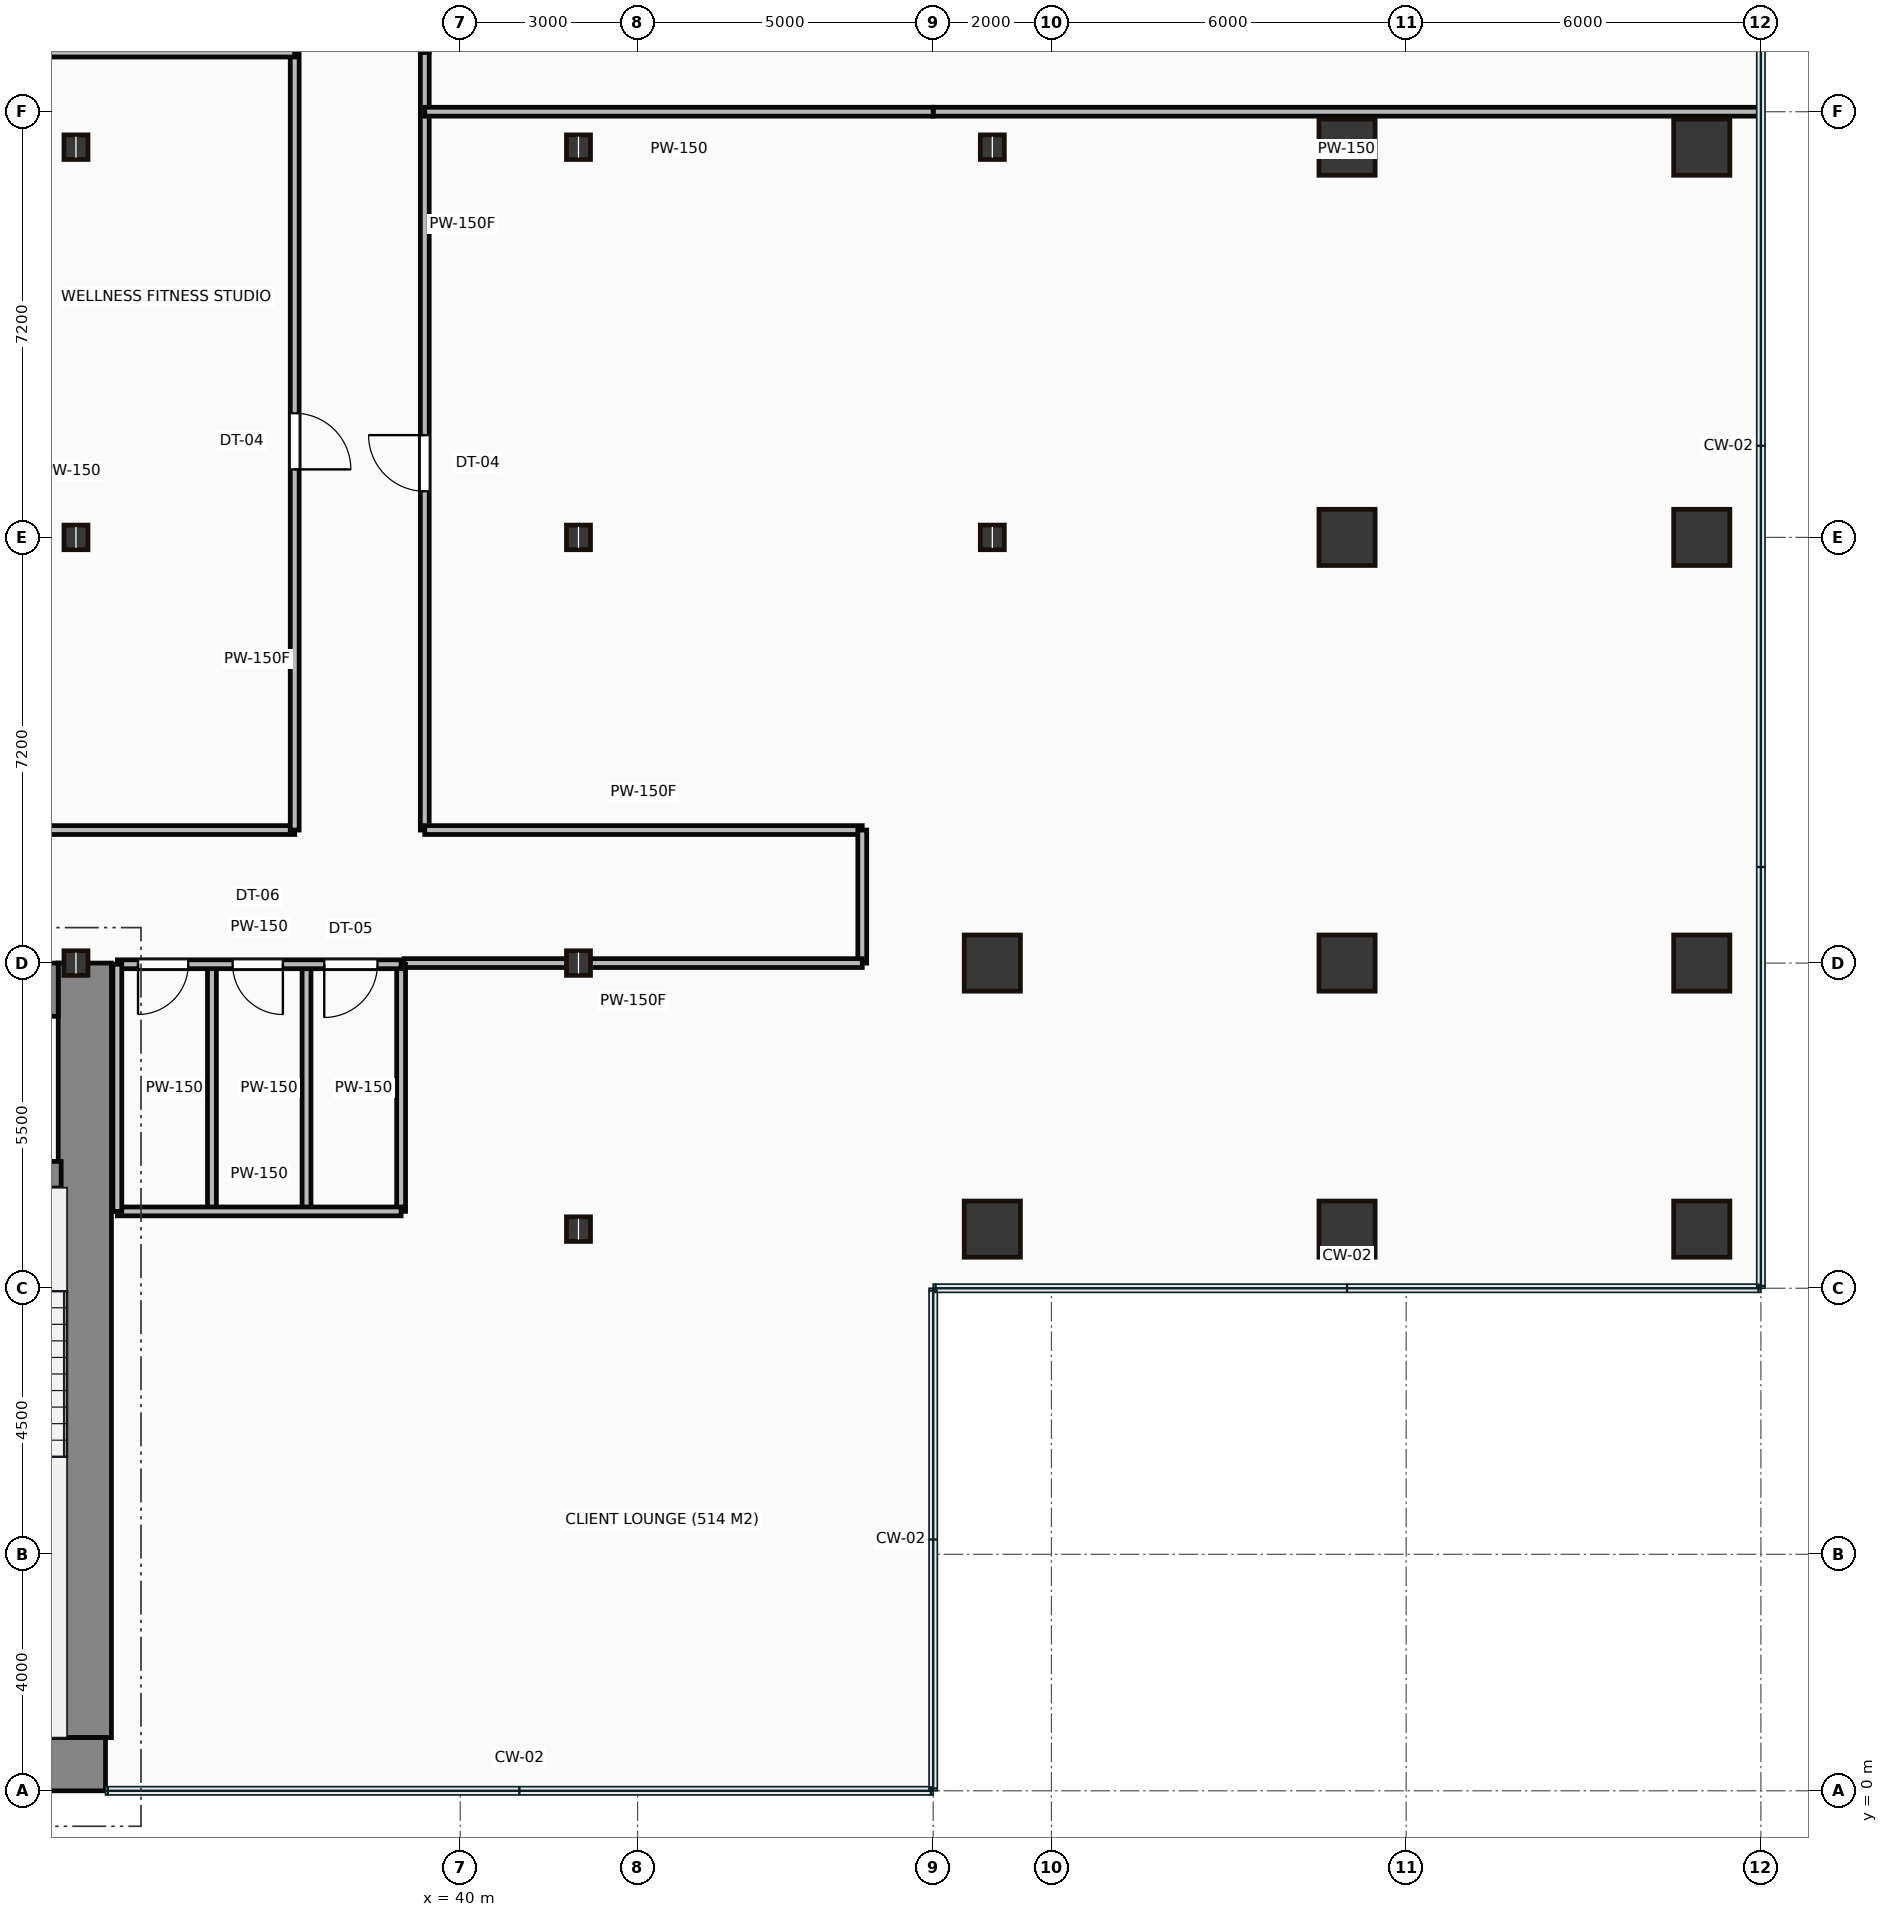
"""IFC4 building model, lengths in metres.
Left out: names, types, materials, properties, quantities, classifications, styles, units other than length and angle.
Written with IfcOpenShell. Run it as: python <this file> out.ifc"""

import sys

from ifc_helpers import new_model, si_unit, direction, frame, frame_2d, origin, origin_2d, place, context, subcontext, project, spatial, rectangle, hollow_rectangle, i_section, extrude, source, transform, mapped, element, fill, save


model = new_model("IFC4")
c1 = context("Model", 3, precision=1e-05, world=origin(), true_north=direction((0.0, 1.0)))
c2 = subcontext(c1, "Body", "Model", "MODEL_VIEW")
j1 = project(units=[si_unit("LENGTHUNIT", "METRE"), si_unit("PLANEANGLEUNIT", "RADIAN")], contexts=[c1])
p1 = place(None, origin())
s1 = spatial("IfcSite", under=j1, at=p1, CompositionType="ELEMENT")
p2 = place(p1, origin())
s2 = spatial("IfcBuilding", under=s1, at=p2, CompositionType="ELEMENT")
p3 = place(p2, frame((0.0, 0.0, 72.65)))
s3 = spatial("IfcBuildingStorey", under=s2, at=p3, CompositionType="ELEMENT", Elevation=72.65)
m1 = source(origin(), c2, "Body", "SweptSolid", [
    extrude(rectangle(XDim=29.5, YDim=0.9, at=frame_2d((14.75, 0.0))), origin(), (0.0, 0.0, 1.0), 3.65),
])
p4 = place(p3, frame((4.5, 0.45, 0.0), z_axis=(0.0, 0.0, 1.0), x_axis=(1.0, 0.0, 0.0)))
e1 = element("IfcWall", 1, at=p4, inside=s3, PredefinedType="SHEAR", context=c2, shape_type="MappedRepresentation", body=[
    mapped(m1, transform((0.0, 0.0, 0.0))),
])
m2 = source(origin(), c2, "Body", "SweptSolid", [
    extrude(rectangle(XDim=13.1, YDim=0.9, at=frame_2d((6.55, 0.0))), origin(), (0.0, 0.0, 1.0), 3.65),
])
p5 = place(p3, frame((33.65, 0.9, 0.0), z_axis=(0.0, 0.0, 1.0), x_axis=(0.0, 1.0, 0.0)))
e2 = element("IfcWall", 2, at=p5, inside=s3, PredefinedType="SHEAR", context=c2, shape_type="MappedRepresentation", body=[
    mapped(m2, transform((0.0, 0.0, 0.0))),
])
m3 = source(origin(), c2, "Body", "SweptSolid", [
    extrude(rectangle(XDim=12.6, YDim=0.9, at=frame_2d((6.3, 0.0))), origin(), (0.0, 0.0, 1.0), 3.65),
])
p6 = place(p3, frame((20.6, 13.55, 0.0), z_axis=(0.0, 0.0, 1.0), x_axis=(1.0, 0.0, 0.0)))
e3 = element("IfcWall", 3, at=p6, inside=s3, PredefinedType="SHEAR", context=c2, shape_type="MappedRepresentation", body=[
    mapped(m3, transform((0.0, 0.0, 0.0))),
])
p7 = place(p6, frame((9.25, 0.0, 0.0)))
e4 = element("IfcOpeningElement", 4, at=p7, cuts=e3, PredefinedType="OPENING", context=c2, shape_type="SweptSolid", body=[
    extrude(rectangle(XDim=1.1, YDim=2.15, at=frame_2d((0.55, 1.075))), frame((0.0, 0.46, 0.0), z_axis=(0.0, -1.0, 0.0), x_axis=(1.0, 0.0, 0.0)), (0.0, 0.0, 1.0), 0.92),
])
m4 = source(origin(), c2, "Body", "SweptSolid", [
    extrude(rectangle(XDim=3.39, YDim=0.45, at=frame_2d((1.695, 0.0))), origin(), (0.0, 0.0, 1.0), 3.65),
])
p8 = place(p3, frame((29.86, 10.42, 0.0), z_axis=(0.0, 0.0, 1.0), x_axis=(1.0, 0.0, 0.0)))
e5 = element("IfcWall", 5, at=p8, inside=s3, PredefinedType="SHEAR", context=c2, shape_type="MappedRepresentation", body=[
    mapped(m4, transform((0.0, 0.0, 0.0))),
])
p9 = place(p8, frame((1.1, 0.0, 0.0)))
e6 = element("IfcOpeningElement", 6, at=p9, cuts=e5, PredefinedType="OPENING", context=c2, shape_type="SweptSolid", body=[
    extrude(rectangle(XDim=1.1, YDim=2.15, at=frame_2d((0.55, 1.075))), frame((0.0, 0.235, 0.0), z_axis=(0.0, -1.0, 0.0), x_axis=(1.0, 0.0, 0.0)), (0.0, 0.0, 1.0), 0.47),
])
m5 = source(origin(), c2, "Body", "SweptSolid", [
    extrude(i_section(OverallWidth=0.406, OverallDepth=0.416, WebThickness=0.03, FlangeThickness=0.048, at=origin_2d()), origin(), (0.0, 0.0, 1.0), 3.65),
])
for number, where, z_axis, x_axis in (
    (7, (33.5, 14.0, 0.0), (0.0, 0.0, 1.0), (1.0, 0.0, 0.0)),
    (8, (33.5, 21.2, 0.0), (0.0, 0.0, 1.0), (1.0, 0.0, 0.0)),
    (9, (33.5, 27.8, 0.0), (0.0, 0.0, 1.0), (1.0, 0.0, 0.0)),
    (10, (42.0, 9.5, 0.0), (0.0, 0.0, 1.0), (1.0, 0.0, 0.0)),
    (11, (42.0, 14.0, 0.0), (0.0, 0.0, 1.0), (1.0, 0.0, 0.0)),
    (12, (42.0, 21.2, 0.0), (0.0, 0.0, 1.0), (1.0, 0.0, 0.0)),
    (13, (42.0, 27.8, 0.0), (0.0, 0.0, 1.0), (1.0, 0.0, 0.0)),
):
    element("IfcColumn", number, at=place(p3, frame(where, z_axis=z_axis, x_axis=x_axis)), inside=s3, PredefinedType="COLUMN", context=c2, shape_type="MappedRepresentation", body=[
        mapped(m5, transform((0.0, 0.0, 0.0))),
    ])
m6 = source(origin(), c2, "Body", "SweptSolid", [
    extrude(hollow_rectangle(XDim=0.95, YDim=0.95, WallThickness=0.045, at=origin_2d()), origin(), (0.0, 0.0, 1.0), 3.65),
])
for number, where, z_axis, x_axis in (
    (14, (49.0, 9.5, 0.0), (0.0, 0.0, 1.0), (1.0, 0.0, 0.0)),
    (15, (49.0, 14.0, 0.0), (0.0, 0.0, 1.0), (1.0, 0.0, 0.0)),
):
    element("IfcColumn", number, at=place(p3, frame(where, z_axis=z_axis, x_axis=x_axis)), inside=s3, PredefinedType="COLUMN", context=c2, shape_type="MappedRepresentation", body=[
        mapped(m6, transform((0.0, 0.0, 0.0))),
    ])
for number, where, z_axis, x_axis in (
    (16, (49.0, 21.2, 0.0), (0.0, 0.0, 1.0), (1.0, 0.0, 0.0)),
    (17, (49.0, 27.8, 0.0), (0.0, 0.0, 1.0), (1.0, 0.0, 0.0)),
):
    element("IfcColumn", number, at=place(p3, frame(where, z_axis=z_axis, x_axis=x_axis)), inside=s3, PredefinedType="COLUMN", context=c2, shape_type="MappedRepresentation", body=[
        mapped(m5, transform((0.0, 0.0, 0.0))),
    ])
for number, where, z_axis, x_axis in (
    (18, (55.0, 9.5, 0.0), (0.0, 0.0, 1.0), (1.0, 0.0, 0.0)),
    (19, (55.0, 14.0, 0.0), (0.0, 0.0, 1.0), (1.0, 0.0, 0.0)),
    (20, (55.0, 21.2, 0.0), (0.0, 0.0, 1.0), (1.0, 0.0, 0.0)),
    (21, (55.0, 27.8, 0.0), (0.0, 0.0, 1.0), (1.0, 0.0, 0.0)),
    (22, (61.0, 9.5, 0.0), (0.0, 0.0, 1.0), (1.0, 0.0, 0.0)),
    (23, (61.0, 14.0, 0.0), (0.0, 0.0, 1.0), (1.0, 0.0, 0.0)),
    (24, (61.0, 21.2, 0.0), (0.0, 0.0, 1.0), (1.0, 0.0, 0.0)),
    (25, (61.0, 27.8, 0.0), (0.0, 0.0, 1.0), (1.0, 0.0, 0.0)),
):
    element("IfcColumn", number, at=place(p3, frame(where, z_axis=z_axis, x_axis=x_axis)), inside=s3, PredefinedType="COLUMN", context=c2, shape_type="MappedRepresentation", body=[
        mapped(m6, transform((0.0, 0.0, 0.0))),
    ])
m7 = source(origin(), c2, "Body", "SweptSolid", [
    extrude(rectangle(XDim=4.8, YDim=0.15, at=frame_2d((2.4, 0.0))), origin(), (0.0, 0.0, 1.0), 2.625),
])
p10 = place(p3, frame((34.2, 13.98, 0.0), z_axis=(0.0, 0.0, 1.0), x_axis=(1.0, 0.0, 0.0)))
e26 = element("IfcWall", 26, at=p10, inside=s3, PredefinedType="PARTITIONING", context=c2, shape_type="MappedRepresentation", body=[
    mapped(m7, transform((0.0, 0.0, 0.0))),
])
p11 = place(p10, frame((0.35, 0.0, 0.0)))
e27 = element("IfcOpeningElement", 27, at=p11, cuts=e26, PredefinedType="OPENING", context=c2, shape_type="SweptSolid", body=[
    extrude(rectangle(XDim=0.85, YDim=2.1, at=frame_2d((0.425, 1.05))), frame((0.0, 0.085, 0.0), z_axis=(0.0, -1.0, 0.0), x_axis=(1.0, 0.0, 0.0)), (0.0, 0.0, 1.0), 0.17),
])
p12 = place(p10, frame((1.95, 0.0, 0.0)))
e28 = element("IfcOpeningElement", 28, at=p12, cuts=e26, PredefinedType="OPENING", context=c2, shape_type="SweptSolid", body=[
    extrude(rectangle(XDim=0.85, YDim=2.1, at=frame_2d((0.425, 1.05))), frame((0.0, 0.085, 0.0), z_axis=(0.0, -1.0, 0.0), x_axis=(1.0, 0.0, 0.0)), (0.0, 0.0, 1.0), 0.17),
])
p13 = place(p10, frame((3.5, 0.0, 0.0)))
e29 = element("IfcOpeningElement", 29, at=p13, cuts=e26, PredefinedType="OPENING", context=c2, shape_type="SweptSolid", body=[
    extrude(rectangle(XDim=0.9, YDim=2.1, at=frame_2d((0.45, 1.05))), frame((0.0, 0.085, 0.0), z_axis=(0.0, -1.0, 0.0), x_axis=(1.0, 0.0, 0.0)), (0.0, 0.0, 1.0), 0.17),
])
m8 = source(origin(), c2, "Body", "SweptSolid", [
    extrude(rectangle(XDim=4.8, YDim=0.15, at=frame_2d((2.4, 0.0))), origin(), (0.0, 0.0, 1.0), 3.4),
])
p14 = place(p3, frame((34.2, 9.8, 0.0), z_axis=(0.0, 0.0, 1.0), x_axis=(1.0, 0.0, 0.0)))
e30 = element("IfcWall", 30, at=p14, inside=s3, PredefinedType="PARTITIONING", context=c2, shape_type="MappedRepresentation", body=[
    mapped(m8, transform((0.0, 0.0, 0.0))),
])
m9 = source(origin(), c2, "Body", "SweptSolid", [
    extrude(rectangle(XDim=4.18, YDim=0.15, at=frame_2d((2.09, 0.0))), origin(), (0.0, 0.0, 1.0), 3.4),
])
for number, where, z_axis, x_axis in (
    (31, (39.0, 9.8, 0.0), (0.0, 0.0, 1.0), (0.0, 1.0, 0.0)),
    (32, (34.2, 9.8, 0.0), (0.0, 0.0, 1.0), (0.0, 1.0, 0.0)),
    (33, (35.8, 9.8, 0.0), (0.0, 0.0, 1.0), (0.0, 1.0, 0.0)),
    (34, (37.4, 9.8, 0.0), (0.0, 0.0, 1.0), (0.0, 1.0, 0.0)),
):
    element("IfcWall", number, at=place(p3, frame(where, z_axis=z_axis, x_axis=x_axis)), inside=s3, PredefinedType="PARTITIONING", context=c2, shape_type="MappedRepresentation", body=[
        mapped(m9, transform((0.0, 0.0, 0.0))),
    ])
m10 = source(origin(), c2, "Body", "SweptSolid", [
    extrude(rectangle(XDim=13.15, YDim=0.15, at=frame_2d((6.575, 0.0))), origin(), (0.0, 0.0, 1.0), 3.4),
])
p15 = place(p3, frame((39.4, 29.4, 0.0), z_axis=(0.0, 0.0, 1.0), x_axis=(0.0, -1.0, 0.0)))
e35 = element("IfcWall", 35, at=p15, inside=s3, PredefinedType="PARTITIONING", context=c2, shape_type="MappedRepresentation", body=[
    mapped(m10, transform((0.0, 0.0, 0.0))),
])
p16 = place(p15, frame((6.47, 0.0, 0.0)))
e36 = element("IfcOpeningElement", 36, at=p16, cuts=e35, PredefinedType="OPENING", context=c2, shape_type="SweptSolid", body=[
    extrude(rectangle(XDim=0.95, YDim=2.15, at=frame_2d((0.475, 1.075))), frame((0.0, 0.085, 0.0), z_axis=(0.0, -1.0, 0.0), x_axis=(1.0, 0.0, 0.0)), (0.0, 0.0, 1.0), 0.17),
])
m11 = source(origin(), c2, "Body", "SweptSolid", [
    extrude(rectangle(XDim=7.4, YDim=0.15, at=frame_2d((3.7, 0.0))), origin(), (0.0, 0.0, 1.0), 3.4),
])
p17 = place(p3, frame((39.4, 16.25, 0.0), z_axis=(0.0, 0.0, 1.0), x_axis=(1.0, 0.0, 0.0)))
e37 = element("IfcWall", 37, at=p17, inside=s3, PredefinedType="PARTITIONING", context=c2, shape_type="MappedRepresentation", body=[
    mapped(m11, transform((0.0, 0.0, 0.0))),
])
m12 = source(origin(), c2, "Body", "SweptSolid", [
    extrude(rectangle(XDim=2.25, YDim=0.15, at=frame_2d((1.125, 0.0))), origin(), (0.0, 0.0, 1.0), 3.4),
])
p18 = place(p3, frame((46.8, 16.25, 0.0), z_axis=(0.0, 0.0, 1.0), x_axis=(0.0, -1.0, 0.0)))
e38 = element("IfcWall", 38, at=p18, inside=s3, PredefinedType="PARTITIONING", context=c2, shape_type="MappedRepresentation", body=[
    mapped(m12, transform((0.0, 0.0, 0.0))),
])
m13 = source(origin(), c2, "Body", "SweptSolid", [
    extrude(rectangle(XDim=7.75, YDim=0.15, at=frame_2d((3.875, 0.0))), origin(), (0.0, 0.0, 1.0), 2.625),
])
p19 = place(p3, frame((46.8, 14.0, 0.0), z_axis=(0.0, 0.0, 1.0), x_axis=(-1.0, 0.0, 0.0)))
e39 = element("IfcWall", 39, at=p19, inside=s3, PredefinedType="PARTITIONING", context=c2, shape_type="MappedRepresentation", body=[
    mapped(m13, transform((0.0, 0.0, 0.0))),
])
m14 = source(origin(), c2, "Body", "SweptSolid", [
    extrude(rectangle(XDim=25.2, YDim=0.15, at=frame_2d((12.6, 0.0))), origin(), (0.0, 0.0, 1.0), 3.4),
])
p20 = place(p3, frame((12.0, 16.25, 0.0), z_axis=(0.0, 0.0, 1.0), x_axis=(1.0, 0.0, 0.0)))
e40 = element("IfcWall", 40, at=p20, inside=s3, PredefinedType="PARTITIONING", context=c2, shape_type="MappedRepresentation", body=[
    mapped(m14, transform((0.0, 0.0, 0.0))),
])
p21 = place(p20, frame((14.925, 0.0, 0.0)))
e41 = element("IfcOpeningElement", 41, at=p21, cuts=e40, PredefinedType="OPENING", context=c2, shape_type="SweptSolid", body=[
    extrude(rectangle(XDim=0.95, YDim=2.15, at=frame_2d((0.475, 1.075))), frame((0.0, 0.085, 0.0), z_axis=(0.0, -1.0, 0.0), x_axis=(1.0, 0.0, 0.0)), (0.0, 0.0, 1.0), 0.17),
])
p22 = place(p3, frame((37.2, 16.25, 0.0), z_axis=(0.0, 0.0, 1.0), x_axis=(0.0, 1.0, 0.0)))
e42 = element("IfcWall", 42, at=p22, inside=s3, PredefinedType="PARTITIONING", context=c2, shape_type="MappedRepresentation", body=[
    mapped(m10, transform((0.0, 0.0, 0.0))),
])
p23 = place(p22, frame((6.1, 0.0, 0.0)))
e43 = element("IfcOpeningElement", 43, at=p23, cuts=e42, PredefinedType="OPENING", context=c2, shape_type="SweptSolid", body=[
    extrude(rectangle(XDim=0.95, YDim=2.15, at=frame_2d((0.475, 1.075))), frame((0.0, 0.085, 0.0), z_axis=(0.0, -1.0, 0.0), x_axis=(1.0, 0.0, 0.0)), (0.0, 0.0, 1.0), 0.17),
])
p24 = place(p3, frame((37.2, 29.4, 0.0), z_axis=(0.0, 0.0, 1.0), x_axis=(-1.0, 0.0, 0.0)))
e44 = element("IfcWall", 44, at=p24, inside=s3, PredefinedType="PARTITIONING", context=c2, shape_type="MappedRepresentation", body=[
    mapped(m14, transform((0.0, 0.0, 0.0))),
])
m15 = source(origin(), c2, "Body", "SweptSolid", [
    extrude(rectangle(XDim=13.98, YDim=0.15, at=frame_2d((6.99, 0.0))), origin(), (0.0, 0.0, 1.0), 3.4),
])
p25 = place(p3, frame((61.98, 28.4, 0.0), z_axis=(0.0, 0.0, 1.0), x_axis=(-1.0, 0.0, 0.0)))
e45 = element("IfcWall", 45, at=p25, inside=s3, PredefinedType="PARTITIONING", context=c2, shape_type="MappedRepresentation", body=[
    mapped(m15, transform((0.0, 0.0, 0.0))),
])
m16 = source(origin(), c2, "Body", "SweptSolid", [
    extrude(rectangle(XDim=8.6, YDim=0.15, at=frame_2d((4.3, 0.0))), origin(), (0.0, 0.0, 1.0), 3.4),
])
p26 = place(p3, frame((48.0, 28.4, 0.0), z_axis=(0.0, 0.0, 1.0), x_axis=(-1.0, 0.0, 0.0)))
e46 = element("IfcWall", 46, at=p26, inside=s3, PredefinedType="PARTITIONING", context=c2, shape_type="MappedRepresentation", body=[
    mapped(m16, transform((0.0, 0.0, 0.0))),
])
m17 = source(origin(), c2, "Body", "SweptSolid", [
    extrude(rectangle(XDim=0.85, YDim=2.1, at=frame_2d((0.425, 1.05))), frame((0.0, 0.025, 0.0), z_axis=(0.0, -1.0, 0.0), x_axis=(1.0, 0.0, 0.0)), (0.0, 0.0, 1.0), 0.05),
])
p27 = place(p11, frame((0.85, 0.0, 0.0), z_axis=(0.0, 0.0, 1.0), x_axis=(-1.0, 0.0, 0.0)))
e47 = element("IfcDoor", 47, at=p27, inside=s3, OperationType="SINGLE_SWING_LEFT", PredefinedType="DOOR", context=c2, shape_type="MappedRepresentation", body=[
    mapped(m17, transform((0.0, 0.0, 0.0))),
])
fill(e27, e47)
p28 = place(p12, frame((0.85, 0.0, 0.0), z_axis=(0.0, 0.0, 1.0), x_axis=(-1.0, 0.0, 0.0)))
e48 = element("IfcDoor", 48, at=p28, inside=s3, OperationType="SINGLE_SWING_RIGHT", PredefinedType="DOOR", context=c2, shape_type="MappedRepresentation", body=[
    mapped(m17, transform((0.0, 0.0, 0.0))),
])
fill(e28, e48)
m18 = source(origin(), c2, "Body", "SweptSolid", [
    extrude(rectangle(XDim=0.9, YDim=2.1, at=frame_2d((0.45, 1.05))), frame((0.0, 0.025, 0.0), z_axis=(0.0, -1.0, 0.0), x_axis=(1.0, 0.0, 0.0)), (0.0, 0.0, 1.0), 0.05),
])
p29 = place(p13, frame((0.9, 0.0, 0.0), z_axis=(0.0, 0.0, 1.0), x_axis=(-1.0, 0.0, 0.0)))
e49 = element("IfcDoor", 49, at=p29, inside=s3, OperationType="SINGLE_SWING_LEFT", PredefinedType="DOOR", context=c2, shape_type="MappedRepresentation", body=[
    mapped(m18, transform((0.0, 0.0, 0.0))),
])
fill(e29, e49)
m19 = source(origin(), c2, "Body", "SweptSolid", [
    extrude(rectangle(XDim=0.95, YDim=2.15, at=frame_2d((0.475, 1.075))), frame((0.0, 0.025, 0.0), z_axis=(0.0, -1.0, 0.0), x_axis=(1.0, 0.0, 0.0)), (0.0, 0.0, 1.0), 0.05),
])
p30 = place(p23, origin())
e50 = element("IfcDoor", 50, at=p30, inside=s3, OperationType="SINGLE_SWING_LEFT", PredefinedType="DOOR", context=c2, shape_type="MappedRepresentation", body=[
    mapped(m19, transform((0.0, 0.0, 0.0))),
])
fill(e43, e50)
p31 = place(p16, origin())
e51 = element("IfcDoor", 51, at=p31, inside=s3, OperationType="SINGLE_SWING_LEFT", PredefinedType="DOOR", context=c2, shape_type="MappedRepresentation", body=[
    mapped(m19, transform((0.0, 0.0, 0.0))),
])
fill(e36, e51)
save(model, sys.argv[1])
